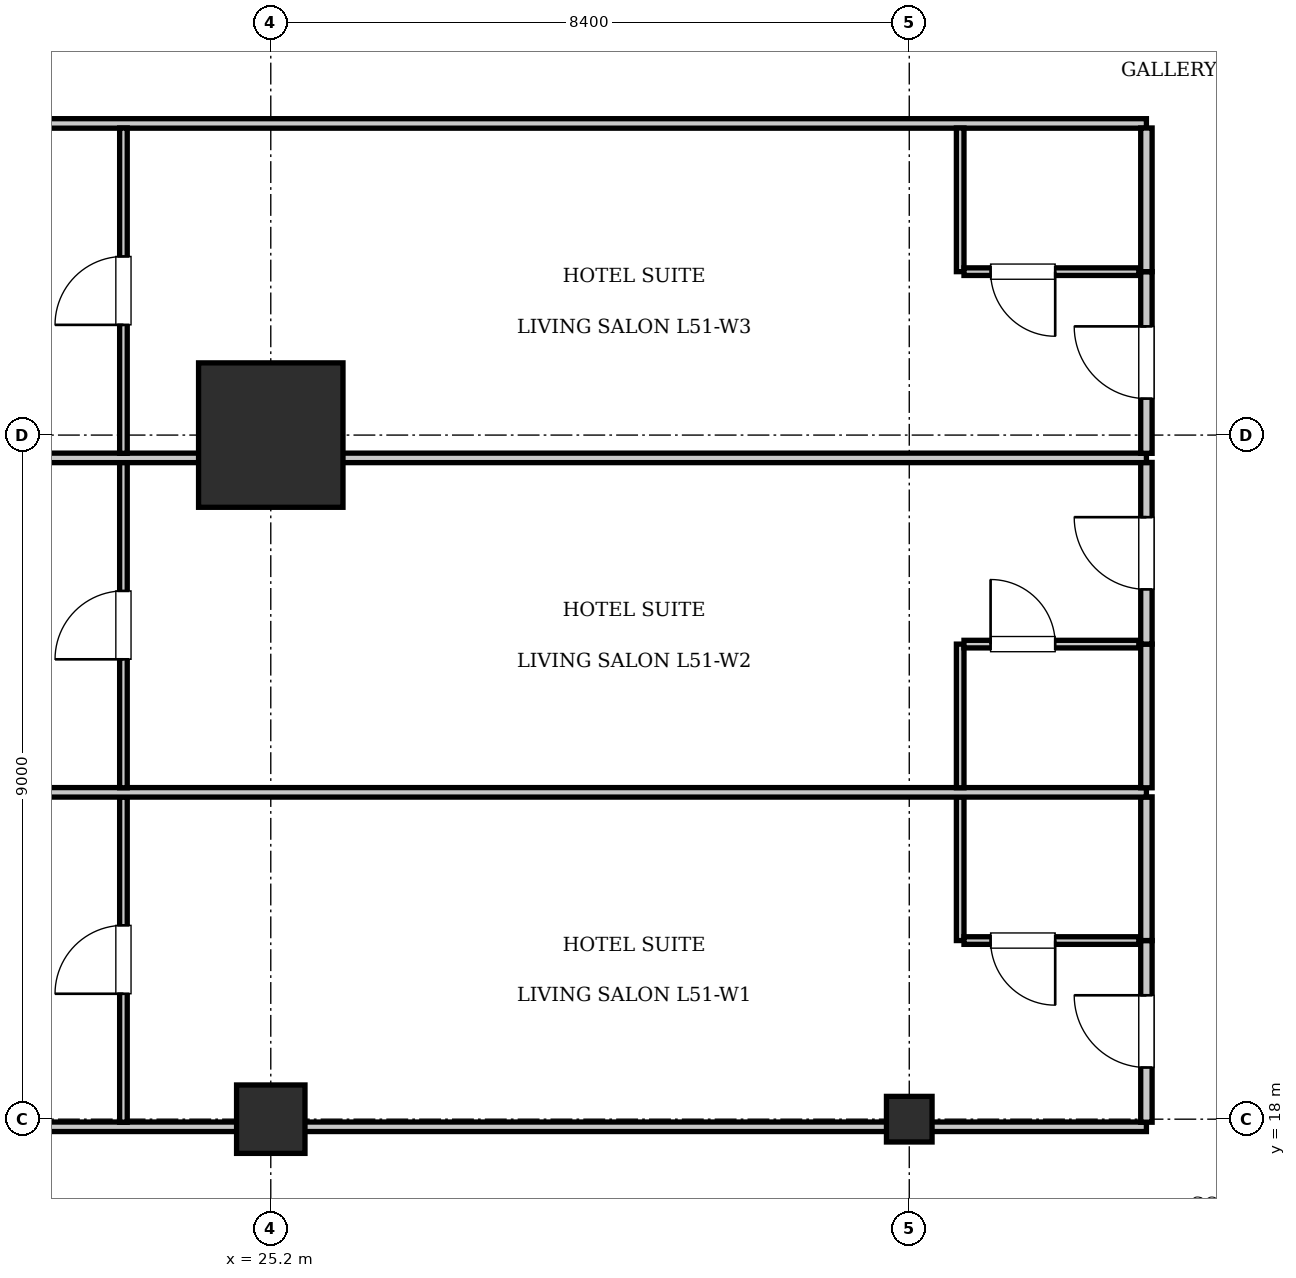
"""IFC4 building model, lengths in metres.
Left out: names, types, materials, properties, quantities, classifications, styles, units other than length and angle.
Written with IfcOpenShell. Run it as: python <this file> out.ifc"""

import sys

from ifc_helpers import new_model, si_unit, direction, frame, frame_2d, origin, origin_2d, place, context, subcontext, project, spatial, rectangle, i_section, extrude, element, fill, save


model = new_model("IFC4")
c1 = context("Model", 3, precision=1e-05, world=origin(), true_north=direction((0.0, 1.0)))
c2 = subcontext(c1, "Body", "Model", "MODEL_VIEW")
j1 = project(units=[si_unit("LENGTHUNIT", "METRE"), si_unit("PLANEANGLEUNIT", "RADIAN")], contexts=[c1])
p1 = place(None, origin())
s1 = spatial("IfcSite", under=j1, at=p1, CompositionType="ELEMENT")
p2 = place(p1, origin())
s2 = spatial("IfcBuilding", under=s1, at=p2, CompositionType="ELEMENT")
p3 = place(p2, frame((0.0, 0.0, 208.25)))
s3 = spatial("IfcBuildingStorey", under=s2, at=p3, CompositionType="ELEMENT", Elevation=208.25)
p4 = place(p3, frame((25.2, 27.0, 0.0), z_axis=(0.0, 0.0, 1.0), x_axis=(1.0, 0.0, 0.0)))
e1 = element("IfcColumn", 1, at=p4, inside=s3, PredefinedType="COLUMN", context=c2, shape_type="SweptSolid", body=[
    extrude(rectangle(XDim=1.9, YDim=1.9, at=origin_2d()), origin(), (0.0, 0.0, 1.0), 3.85),
])
p5 = place(p3, frame((25.2, 18.0, 0.0), z_axis=(0.0, 0.0, 1.0), x_axis=(1.0, 0.0, 0.0)))
e2 = element("IfcColumn", 2, at=p5, inside=s3, PredefinedType="COLUMN", context=c2, shape_type="SweptSolid", body=[
    extrude(rectangle(XDim=0.9, YDim=0.9, at=origin_2d()), origin(), (0.0, 0.0, 1.0), 3.85),
])
p6 = place(p3, frame((33.6, 18.0, 0.0), z_axis=(0.0, 0.0, 1.0), x_axis=(1.0, 0.0, 0.0)))
e3 = element("IfcColumn", 3, at=p6, inside=s3, PredefinedType="COLUMN", context=c2, shape_type="SweptSolid", body=[
    extrude(i_section(OverallWidth=0.6, OverallDepth=0.6, WebThickness=0.025, FlangeThickness=0.038, at=origin_2d()), origin(), (0.0, 0.0, 1.0), 3.85),
])
p7 = place(p3, frame((13.2, 17.9, 0.0), z_axis=(0.0, 0.0, 1.0), x_axis=(1.0, 0.0, 0.0)))
e4 = element("IfcWall", 4, at=p7, inside=s3, PredefinedType="PARTITIONING", context=c2, shape_type="SweptSolid", body=[
    extrude(rectangle(XDim=23.52, YDim=0.125, at=frame_2d((11.76, 0.0))), origin(), (0.0, 0.0, 1.0), 3.071),
])
p8 = place(p3, frame((13.2, 31.1, 0.0), z_axis=(0.0, 0.0, 1.0), x_axis=(1.0, 0.0, 0.0)))
e5 = element("IfcWall", 5, at=p8, inside=s3, PredefinedType="PARTITIONING", context=c2, shape_type="SweptSolid", body=[
    extrude(rectangle(XDim=23.52, YDim=0.125, at=frame_2d((11.76, 0.0))), origin(), (0.0, 0.0, 1.0), 3.61),
])
p9 = place(p3, frame((36.72, 17.96, 0.0), z_axis=(0.0, 0.0, 1.0), x_axis=(0.0, 1.0, 0.0)))
e6 = element("IfcWall", 6, at=p9, inside=s3, PredefinedType="PARTITIONING", context=c2, shape_type="SweptSolid", body=[
    extrude(rectangle(XDim=2.39, YDim=0.15, at=frame_2d((1.195, 0.0))), origin(), (0.0, 0.0, 1.0), 3.61),
])
p10 = place(p9, frame((0.72, 0.0, 0.0)))
e7 = element("IfcOpeningElement", 7, at=p10, cuts=e6, PredefinedType="OPENING", context=c2, shape_type="SweptSolid", body=[
    extrude(rectangle(XDim=0.95, YDim=2.15, at=frame_2d((0.475, 1.075))), frame((0.0, 0.085, 0.0), z_axis=(0.0, -1.0, 0.0), x_axis=(1.0, 0.0, 0.0)), (0.0, 0.0, 1.0), 0.17),
])
p11 = place(p3, frame((36.72, 20.35, 0.0), z_axis=(0.0, 0.0, 1.0), x_axis=(0.0, 1.0, 0.0)))
e8 = element("IfcWall", 8, at=p11, inside=s3, PredefinedType="PARTITIONING", context=c2, shape_type="SweptSolid", body=[
    extrude(rectangle(XDim=1.89, YDim=0.15, at=frame_2d((0.945, 0.0))), origin(), (0.0, 0.0, 1.0), 3.61),
])
p12 = place(p3, frame((34.27, 20.35, 0.0), z_axis=(0.0, 0.0, 1.0), x_axis=(0.0, 1.0, 0.0)))
e9 = element("IfcWall", 9, at=p12, inside=s3, PredefinedType="PARTITIONING", context=c2, shape_type="SweptSolid", body=[
    extrude(rectangle(XDim=1.89, YDim=0.1, at=frame_2d((0.945, 0.0))), origin(), (0.0, 0.0, 1.0), 3.61),
])
p13 = place(p3, frame((34.32, 20.35, 0.0), z_axis=(0.0, 0.0, 1.0), x_axis=(1.0, 0.0, 0.0)))
e10 = element("IfcWall", 10, at=p13, inside=s3, PredefinedType="PARTITIONING", context=c2, shape_type="SweptSolid", body=[
    extrude(rectangle(XDim=2.3, YDim=0.1, at=frame_2d((1.15, 0.0))), origin(), (0.0, 0.0, 1.0), 3.61),
])
p14 = place(p13, frame((0.35, 0.0, 0.0)))
e11 = element("IfcOpeningElement", 11, at=p14, cuts=e10, PredefinedType="OPENING", context=c2, shape_type="SweptSolid", body=[
    extrude(rectangle(XDim=0.85, YDim=2.1, at=frame_2d((0.425, 1.05))), frame((0.0, 0.06, 0.0), z_axis=(0.0, -1.0, 0.0), x_axis=(1.0, 0.0, 0.0)), (0.0, 0.0, 1.0), 0.12),
])
p15 = place(p3, frame((23.262, 17.96, 0.0), z_axis=(0.0, 0.0, 1.0), x_axis=(0.0, 1.0, 0.0)))
e12 = element("IfcWall", 12, at=p15, inside=s3, PredefinedType="PARTITIONING", context=c2, shape_type="SweptSolid", body=[
    extrude(rectangle(XDim=4.28, YDim=0.1, at=frame_2d((2.14, 0.0))), origin(), (0.0, 0.0, 1.0), 3.61),
])
p16 = place(p15, frame((1.69, 0.0, 0.0)))
e13 = element("IfcOpeningElement", 13, at=p16, cuts=e12, PredefinedType="OPENING", context=c2, shape_type="SweptSolid", body=[
    extrude(rectangle(XDim=0.9, YDim=2.1, at=frame_2d((0.45, 1.05))), frame((0.0, 0.06, 0.0), z_axis=(0.0, -1.0, 0.0), x_axis=(1.0, 0.0, 0.0)), (0.0, 0.0, 1.0), 0.12),
])
p17 = place(p3, frame((13.2, 22.3, 0.0), z_axis=(0.0, 0.0, 1.0), x_axis=(1.0, 0.0, 0.0)))
e14 = element("IfcWall", 14, at=p17, inside=s3, PredefinedType="PARTITIONING", context=c2, shape_type="SweptSolid", body=[
    extrude(rectangle(XDim=23.52, YDim=0.125, at=frame_2d((11.76, 0.0))), origin(), (0.0, 0.0, 1.0), 3.61),
])
p18 = place(p3, frame((36.72, 22.36, 0.0), z_axis=(0.0, 0.0, 1.0), x_axis=(0.0, 1.0, 0.0)))
e15 = element("IfcWall", 15, at=p18, inside=s3, PredefinedType="PARTITIONING", context=c2, shape_type="SweptSolid", body=[
    extrude(rectangle(XDim=1.89, YDim=0.15, at=frame_2d((0.945, 0.0))), origin(), (0.0, 0.0, 1.0), 3.61),
])
p19 = place(p3, frame((36.72, 24.25, 0.0), z_axis=(0.0, 0.0, 1.0), x_axis=(0.0, 1.0, 0.0)))
e16 = element("IfcWall", 16, at=p19, inside=s3, PredefinedType="PARTITIONING", context=c2, shape_type="SweptSolid", body=[
    extrude(rectangle(XDim=2.39, YDim=0.15, at=frame_2d((1.195, 0.0))), origin(), (0.0, 0.0, 1.0), 3.61),
])
p20 = place(p19, frame((0.72, 0.0, 0.0)))
e17 = element("IfcOpeningElement", 17, at=p20, cuts=e16, PredefinedType="OPENING", context=c2, shape_type="SweptSolid", body=[
    extrude(rectangle(XDim=0.95, YDim=2.15, at=frame_2d((0.475, 1.075))), frame((0.0, 0.085, 0.0), z_axis=(0.0, -1.0, 0.0), x_axis=(1.0, 0.0, 0.0)), (0.0, 0.0, 1.0), 0.17),
])
p21 = place(p3, frame((34.27, 22.36, 0.0), z_axis=(0.0, 0.0, 1.0), x_axis=(0.0, 1.0, 0.0)))
e18 = element("IfcWall", 18, at=p21, inside=s3, PredefinedType="PARTITIONING", context=c2, shape_type="SweptSolid", body=[
    extrude(rectangle(XDim=1.89, YDim=0.1, at=frame_2d((0.945, 0.0))), origin(), (0.0, 0.0, 1.0), 3.61),
])
p22 = place(p3, frame((34.32, 24.25, 0.0), z_axis=(0.0, 0.0, 1.0), x_axis=(1.0, 0.0, 0.0)))
e19 = element("IfcWall", 19, at=p22, inside=s3, PredefinedType="PARTITIONING", context=c2, shape_type="SweptSolid", body=[
    extrude(rectangle(XDim=2.3, YDim=0.1, at=frame_2d((1.15, 0.0))), origin(), (0.0, 0.0, 1.0), 3.61),
])
p23 = place(p22, frame((0.35, 0.0, 0.0)))
e20 = element("IfcOpeningElement", 20, at=p23, cuts=e19, PredefinedType="OPENING", context=c2, shape_type="SweptSolid", body=[
    extrude(rectangle(XDim=0.85, YDim=2.1, at=frame_2d((0.425, 1.05))), frame((0.0, 0.06, 0.0), z_axis=(0.0, -1.0, 0.0), x_axis=(1.0, 0.0, 0.0)), (0.0, 0.0, 1.0), 0.12),
])
p24 = place(p3, frame((23.262, 22.36, 0.0), z_axis=(0.0, 0.0, 1.0), x_axis=(0.0, 1.0, 0.0)))
e21 = element("IfcWall", 21, at=p24, inside=s3, PredefinedType="PARTITIONING", context=c2, shape_type="SweptSolid", body=[
    extrude(rectangle(XDim=4.28, YDim=0.1, at=frame_2d((2.14, 0.0))), origin(), (0.0, 0.0, 1.0), 3.61),
])
p25 = place(p24, frame((1.69, 0.0, 0.0)))
e22 = element("IfcOpeningElement", 22, at=p25, cuts=e21, PredefinedType="OPENING", context=c2, shape_type="SweptSolid", body=[
    extrude(rectangle(XDim=0.9, YDim=2.1, at=frame_2d((0.45, 1.05))), frame((0.0, 0.06, 0.0), z_axis=(0.0, -1.0, 0.0), x_axis=(1.0, 0.0, 0.0)), (0.0, 0.0, 1.0), 0.12),
])
p26 = place(p3, frame((13.2, 26.7, 0.0), z_axis=(0.0, 0.0, 1.0), x_axis=(1.0, 0.0, 0.0)))
e23 = element("IfcWall", 23, at=p26, inside=s3, PredefinedType="PARTITIONING", context=c2, shape_type="SweptSolid", body=[
    extrude(rectangle(XDim=23.52, YDim=0.125, at=frame_2d((11.76, 0.0))), origin(), (0.0, 0.0, 1.0), 3.61),
])
p27 = place(p3, frame((36.72, 26.76, 0.0), z_axis=(0.0, 0.0, 1.0), x_axis=(0.0, 1.0, 0.0)))
e24 = element("IfcWall", 24, at=p27, inside=s3, PredefinedType="PARTITIONING", context=c2, shape_type="SweptSolid", body=[
    extrude(rectangle(XDim=2.39, YDim=0.15, at=frame_2d((1.195, 0.0))), origin(), (0.0, 0.0, 1.0), 3.61),
])
p28 = place(p27, frame((0.72, 0.0, 0.0)))
e25 = element("IfcOpeningElement", 25, at=p28, cuts=e24, PredefinedType="OPENING", context=c2, shape_type="SweptSolid", body=[
    extrude(rectangle(XDim=0.95, YDim=2.15, at=frame_2d((0.475, 1.075))), frame((0.0, 0.085, 0.0), z_axis=(0.0, -1.0, 0.0), x_axis=(1.0, 0.0, 0.0)), (0.0, 0.0, 1.0), 0.17),
])
p29 = place(p3, frame((36.72, 29.15, 0.0), z_axis=(0.0, 0.0, 1.0), x_axis=(0.0, 1.0, 0.0)))
e26 = element("IfcWall", 26, at=p29, inside=s3, PredefinedType="PARTITIONING", context=c2, shape_type="SweptSolid", body=[
    extrude(rectangle(XDim=1.89, YDim=0.15, at=frame_2d((0.945, 0.0))), origin(), (0.0, 0.0, 1.0), 3.61),
])
p30 = place(p3, frame((34.27, 29.15, 0.0), z_axis=(0.0, 0.0, 1.0), x_axis=(0.0, 1.0, 0.0)))
e27 = element("IfcWall", 27, at=p30, inside=s3, PredefinedType="PARTITIONING", context=c2, shape_type="SweptSolid", body=[
    extrude(rectangle(XDim=1.89, YDim=0.1, at=frame_2d((0.945, 0.0))), origin(), (0.0, 0.0, 1.0), 3.61),
])
p31 = place(p3, frame((34.32, 29.15, 0.0), z_axis=(0.0, 0.0, 1.0), x_axis=(1.0, 0.0, 0.0)))
e28 = element("IfcWall", 28, at=p31, inside=s3, PredefinedType="PARTITIONING", context=c2, shape_type="SweptSolid", body=[
    extrude(rectangle(XDim=2.3, YDim=0.1, at=frame_2d((1.15, 0.0))), origin(), (0.0, 0.0, 1.0), 3.61),
])
p32 = place(p31, frame((0.35, 0.0, 0.0)))
e29 = element("IfcOpeningElement", 29, at=p32, cuts=e28, PredefinedType="OPENING", context=c2, shape_type="SweptSolid", body=[
    extrude(rectangle(XDim=0.85, YDim=2.1, at=frame_2d((0.425, 1.05))), frame((0.0, 0.06, 0.0), z_axis=(0.0, -1.0, 0.0), x_axis=(1.0, 0.0, 0.0)), (0.0, 0.0, 1.0), 0.12),
])
p33 = place(p3, frame((23.262, 26.76, 0.0), z_axis=(0.0, 0.0, 1.0), x_axis=(0.0, 1.0, 0.0)))
e30 = element("IfcWall", 30, at=p33, inside=s3, PredefinedType="PARTITIONING", context=c2, shape_type="SweptSolid", body=[
    extrude(rectangle(XDim=4.28, YDim=0.1, at=frame_2d((2.14, 0.0))), origin(), (0.0, 0.0, 1.0), 3.61),
])
p34 = place(p33, frame((1.69, 0.0, 0.0)))
e31 = element("IfcOpeningElement", 31, at=p34, cuts=e30, PredefinedType="OPENING", context=c2, shape_type="SweptSolid", body=[
    extrude(rectangle(XDim=0.9, YDim=2.1, at=frame_2d((0.45, 1.05))), frame((0.0, 0.06, 0.0), z_axis=(0.0, -1.0, 0.0), x_axis=(1.0, 0.0, 0.0)), (0.0, 0.0, 1.0), 0.12),
])
p35 = place(p14, frame((0.85, 0.0, 0.0), z_axis=(0.0, 0.0, 1.0), x_axis=(-1.0, 0.0, 0.0)))
e32 = element("IfcDoor", 32, at=p35, inside=s3, OperationType="SINGLE_SWING_LEFT", PredefinedType="DOOR", context=c2, shape_type="SweptSolid", body=[
    extrude(rectangle(XDim=0.85, YDim=2.1, at=frame_2d((0.425, 1.05))), frame((0.0, 0.025, 0.0), z_axis=(0.0, -1.0, 0.0), x_axis=(1.0, 0.0, 0.0)), (0.0, 0.0, 1.0), 0.05),
])
fill(e11, e32)
p36 = place(p10, origin())
e33 = element("IfcDoor", 33, at=p36, inside=s3, OperationType="SINGLE_SWING_RIGHT", PredefinedType="DOOR", context=c2, shape_type="SweptSolid", body=[
    extrude(rectangle(XDim=0.95, YDim=2.15, at=frame_2d((0.475, 1.075))), frame((0.0, 0.025, 0.0), z_axis=(0.0, -1.0, 0.0), x_axis=(1.0, 0.0, 0.0)), (0.0, 0.0, 1.0), 0.05),
])
fill(e7, e33)
p37 = place(p16, origin())
e34 = element("IfcDoor", 34, at=p37, inside=s3, OperationType="SINGLE_SWING_LEFT", PredefinedType="DOOR", context=c2, shape_type="SweptSolid", body=[
    extrude(rectangle(XDim=0.9, YDim=2.1, at=frame_2d((0.45, 1.05))), frame((0.0, 0.025, 0.0), z_axis=(0.0, -1.0, 0.0), x_axis=(1.0, 0.0, 0.0)), (0.0, 0.0, 1.0), 0.05),
])
fill(e13, e34)
p38 = place(p23, origin())
e35 = element("IfcDoor", 35, at=p38, inside=s3, OperationType="SINGLE_SWING_LEFT", PredefinedType="DOOR", context=c2, shape_type="SweptSolid", body=[
    extrude(rectangle(XDim=0.85, YDim=2.1, at=frame_2d((0.425, 1.05))), frame((0.0, 0.025, 0.0), z_axis=(0.0, -1.0, 0.0), x_axis=(1.0, 0.0, 0.0)), (0.0, 0.0, 1.0), 0.05),
])
fill(e20, e35)
p39 = place(p20, origin())
e36 = element("IfcDoor", 36, at=p39, inside=s3, OperationType="SINGLE_SWING_RIGHT", PredefinedType="DOOR", context=c2, shape_type="SweptSolid", body=[
    extrude(rectangle(XDim=0.95, YDim=2.15, at=frame_2d((0.475, 1.075))), frame((0.0, 0.025, 0.0), z_axis=(0.0, -1.0, 0.0), x_axis=(1.0, 0.0, 0.0)), (0.0, 0.0, 1.0), 0.05),
])
fill(e17, e36)
p40 = place(p25, origin())
e37 = element("IfcDoor", 37, at=p40, inside=s3, OperationType="SINGLE_SWING_LEFT", PredefinedType="DOOR", context=c2, shape_type="SweptSolid", body=[
    extrude(rectangle(XDim=0.9, YDim=2.1, at=frame_2d((0.45, 1.05))), frame((0.0, 0.025, 0.0), z_axis=(0.0, -1.0, 0.0), x_axis=(1.0, 0.0, 0.0)), (0.0, 0.0, 1.0), 0.05),
])
fill(e22, e37)
p41 = place(p32, frame((0.85, 0.0, 0.0), z_axis=(0.0, 0.0, 1.0), x_axis=(-1.0, 0.0, 0.0)))
e38 = element("IfcDoor", 38, at=p41, inside=s3, OperationType="SINGLE_SWING_LEFT", PredefinedType="DOOR", context=c2, shape_type="SweptSolid", body=[
    extrude(rectangle(XDim=0.85, YDim=2.1, at=frame_2d((0.425, 1.05))), frame((0.0, 0.025, 0.0), z_axis=(0.0, -1.0, 0.0), x_axis=(1.0, 0.0, 0.0)), (0.0, 0.0, 1.0), 0.05),
])
fill(e29, e38)
p42 = place(p28, origin())
e39 = element("IfcDoor", 39, at=p42, inside=s3, OperationType="SINGLE_SWING_RIGHT", PredefinedType="DOOR", context=c2, shape_type="SweptSolid", body=[
    extrude(rectangle(XDim=0.95, YDim=2.15, at=frame_2d((0.475, 1.075))), frame((0.0, 0.025, 0.0), z_axis=(0.0, -1.0, 0.0), x_axis=(1.0, 0.0, 0.0)), (0.0, 0.0, 1.0), 0.05),
])
fill(e25, e39)
p43 = place(p34, origin())
e40 = element("IfcDoor", 40, at=p43, inside=s3, OperationType="SINGLE_SWING_LEFT", PredefinedType="DOOR", context=c2, shape_type="SweptSolid", body=[
    extrude(rectangle(XDim=0.9, YDim=2.1, at=frame_2d((0.45, 1.05))), frame((0.0, 0.025, 0.0), z_axis=(0.0, -1.0, 0.0), x_axis=(1.0, 0.0, 0.0)), (0.0, 0.0, 1.0), 0.05),
])
fill(e31, e40)
save(model, sys.argv[1])
